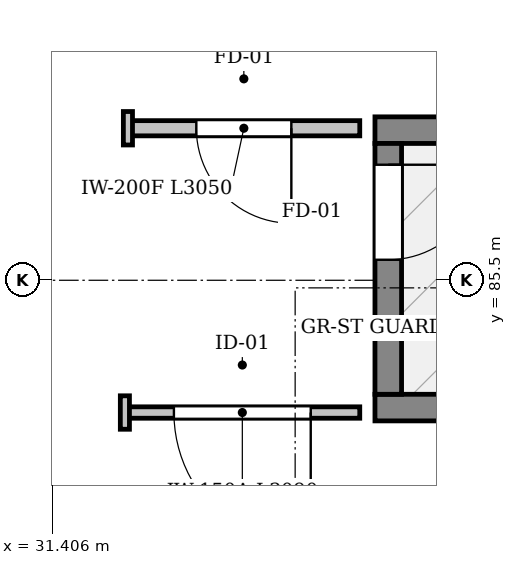
"""IFC4 building model, lengths in metres.
Left out: names, types, materials, properties, quantities, classifications, styles, units other than length and angle.
Written with IfcOpenShell. Run it as: python <this file> out.ifc"""

import sys

from ifc_helpers import new_model, si_unit, direction, frame, frame_2d, origin, place, context, subcontext, project, spatial, rectangle, extrude, element, fill, save


model = new_model("IFC4")
c1 = context("Model", 3, precision=1e-05, world=origin(), true_north=direction((0.0, 1.0)))
c2 = subcontext(c1, "Body", "Model", "MODEL_VIEW")
j1 = project(units=[si_unit("LENGTHUNIT", "METRE"), si_unit("PLANEANGLEUNIT", "RADIAN")], contexts=[c1])
p1 = place(None, origin())
s1 = spatial("IfcSite", under=j1, at=p1, CompositionType="ELEMENT")
p2 = place(p1, origin())
s2 = spatial("IfcBuilding", under=s1, at=p2, CompositionType="ELEMENT")
p3 = place(p2, frame((0.0, 0.0, 15.0)))
s3 = spatial("IfcBuildingStorey", under=s2, at=p3, CompositionType="ELEMENT", Elevation=15.0)
p4 = place(p3, frame((34.825, 78.088, 0.0), z_axis=(0.0, 0.0, 1.0), x_axis=(-0.719339781949, 0.694658389502, 0.0)))
e1 = element("IfcWall", 1, at=p4, inside=s3, PredefinedType="SOLIDWALL", context=c2, shape_type="SweptSolid", body=[
    extrude(rectangle(XDim=16.302, YDim=0.48, at=frame_2d((8.151, 0.0))), origin(), (0.0, 0.0, 1.0), 6.302),
])
for number, where, z_axis, x_axis in (
    (2, (35.65, 83.825, 0.0), (0.0, 0.0, 1.0), (1.0, 0.0, 0.0)),
    (3, (44.75, 87.475, 0.0), (0.0, 0.0, 1.0), (-1.0, 0.0, 0.0)),
):
    element("IfcWall", number, at=place(p3, frame(where, z_axis=z_axis, x_axis=x_axis)), inside=s3, PredefinedType="SHEAR", context=c2, shape_type="SweptSolid", body=[
        extrude(rectangle(XDim=9.1, YDim=0.35, at=frame_2d((4.55, 0.0))), origin(), (0.0, 0.0, 1.0), 3.6),
    ])
p5 = place(p3, frame((35.825, 87.3, 0.0), z_axis=(0.0, 0.0, 1.0), x_axis=(0.0, -1.0, 0.0)))
e4 = element("IfcWall", 4, at=p5, inside=s3, PredefinedType="SHEAR", context=c2, shape_type="SweptSolid", body=[
    extrude(rectangle(XDim=3.3, YDim=0.35, at=frame_2d((1.65, 0.0))), origin(), (0.0, 0.0, 1.0), 3.6),
])
p6 = place(p5, frame((0.28, 0.0, 0.0)))
e5 = element("IfcOpeningElement", 5, at=p6, cuts=e4, PredefinedType="OPENING", context=c2, shape_type="SweptSolid", body=[
    extrude(rectangle(XDim=1.25, YDim=2.2, at=frame_2d((0.625, 1.1))), frame((0.0, 0.185, 0.0), z_axis=(0.0, -1.0, 0.0), x_axis=(1.0, 0.0, 0.0)), (0.0, 0.0, 1.0), 0.37),
])
p7 = place(p3, frame((35.45, 87.5, 0.0), z_axis=(0.0, 0.0, 1.0), x_axis=(-1.0, 0.0, 0.0)))
e6 = element("IfcWall", 6, at=p7, inside=s3, PredefinedType="PARTITIONING", context=c2, shape_type="SweptSolid", body=[
    extrude(rectangle(XDim=3.05, YDim=0.2, at=frame_2d((1.525, 0.0))), origin(), (0.0, 0.0, 1.0), 3.55),
])
p8 = place(p7, frame((0.9, 0.0, 0.0)))
e7 = element("IfcOpeningElement", 7, at=p8, cuts=e6, PredefinedType="OPENING", context=c2, shape_type="SweptSolid", body=[
    extrude(rectangle(XDim=1.25, YDim=2.2, at=frame_2d((0.625, 1.1))), frame((0.0, 0.11, 0.0), z_axis=(0.0, -1.0, 0.0), x_axis=(1.0, 0.0, 0.0)), (0.0, 0.0, 1.0), 0.22),
])
p9 = place(p3, frame((35.45, 83.76, 0.0), z_axis=(0.0, 0.0, 1.0), x_axis=(-1.0, 0.0, 0.0)))
e8 = element("IfcWall", 8, at=p9, inside=s3, PredefinedType="PARTITIONING", context=c2, shape_type="SweptSolid", body=[
    extrude(rectangle(XDim=3.09, YDim=0.15, at=frame_2d((1.545, 0.0))), origin(), (0.0, 0.0, 1.0), 3.55),
])
p10 = place(p9, frame((0.645, 0.0, 0.0)))
e9 = element("IfcOpeningElement", 9, at=p10, cuts=e8, PredefinedType="OPENING", context=c2, shape_type="SweptSolid", body=[
    extrude(rectangle(XDim=1.8, YDim=2.4, at=frame_2d((0.9, 1.2))), frame((0.0, 0.085, 0.0), z_axis=(0.0, -1.0, 0.0), x_axis=(1.0, 0.0, 0.0)), (0.0, 0.0, 1.0), 0.17),
])
for number, where, z_axis, x_axis in (
    (10, (32.4, 87.72, 0.0), (0.0, 0.0, 1.0), (0.0, -1.0, 0.0)),
    (11, (32.36, 83.98, 0.0), (0.0, 0.0, 1.0), (0.0, -1.0, 0.0)),
):
    element("IfcWall", number, at=place(p3, frame(where, z_axis=z_axis, x_axis=x_axis)), inside=s3, PredefinedType="PARTITIONING", context=c2, shape_type="SweptSolid", body=[
        extrude(rectangle(XDim=0.44, YDim=0.12, at=frame_2d((0.22, 0.0))), origin(), (0.0, 0.0, 1.0), 3.55),
    ])
p11 = place(p6, origin())
e12 = element("IfcDoor", 12, at=p11, inside=s3, OperationType="SINGLE_SWING_LEFT", PredefinedType="DOOR", context=c2, shape_type="SweptSolid", body=[
    extrude(rectangle(XDim=1.25, YDim=2.2, at=frame_2d((0.625, 1.1))), frame((0.0, 0.025, 0.0), z_axis=(0.0, -1.0, 0.0), x_axis=(1.0, 0.0, 0.0)), (0.0, 0.0, 1.0), 0.05),
])
fill(e5, e12)
p12 = place(p8, origin())
e13 = element("IfcDoor", 13, at=p12, inside=s3, OperationType="SINGLE_SWING_LEFT", PredefinedType="DOOR", context=c2, shape_type="SweptSolid", body=[
    extrude(rectangle(XDim=1.25, YDim=2.2, at=frame_2d((0.625, 1.1))), frame((0.0, 0.025, 0.0), z_axis=(0.0, -1.0, 0.0), x_axis=(1.0, 0.0, 0.0)), (0.0, 0.0, 1.0), 0.05),
])
fill(e7, e13)
p13 = place(p10, origin())
e14 = element("IfcDoor", 14, at=p13, inside=s3, OperationType="DOUBLE_DOOR_SINGLE_SWING", PredefinedType="DOOR", context=c2, shape_type="SweptSolid", body=[
    extrude(rectangle(XDim=1.8, YDim=2.4, at=frame_2d((0.9, 1.2))), frame((0.0, 0.025, 0.0), z_axis=(0.0, -1.0, 0.0), x_axis=(1.0, 0.0, 0.0)), (0.0, 0.0, 1.0), 0.05),
])
fill(e9, e14)
save(model, sys.argv[1])
